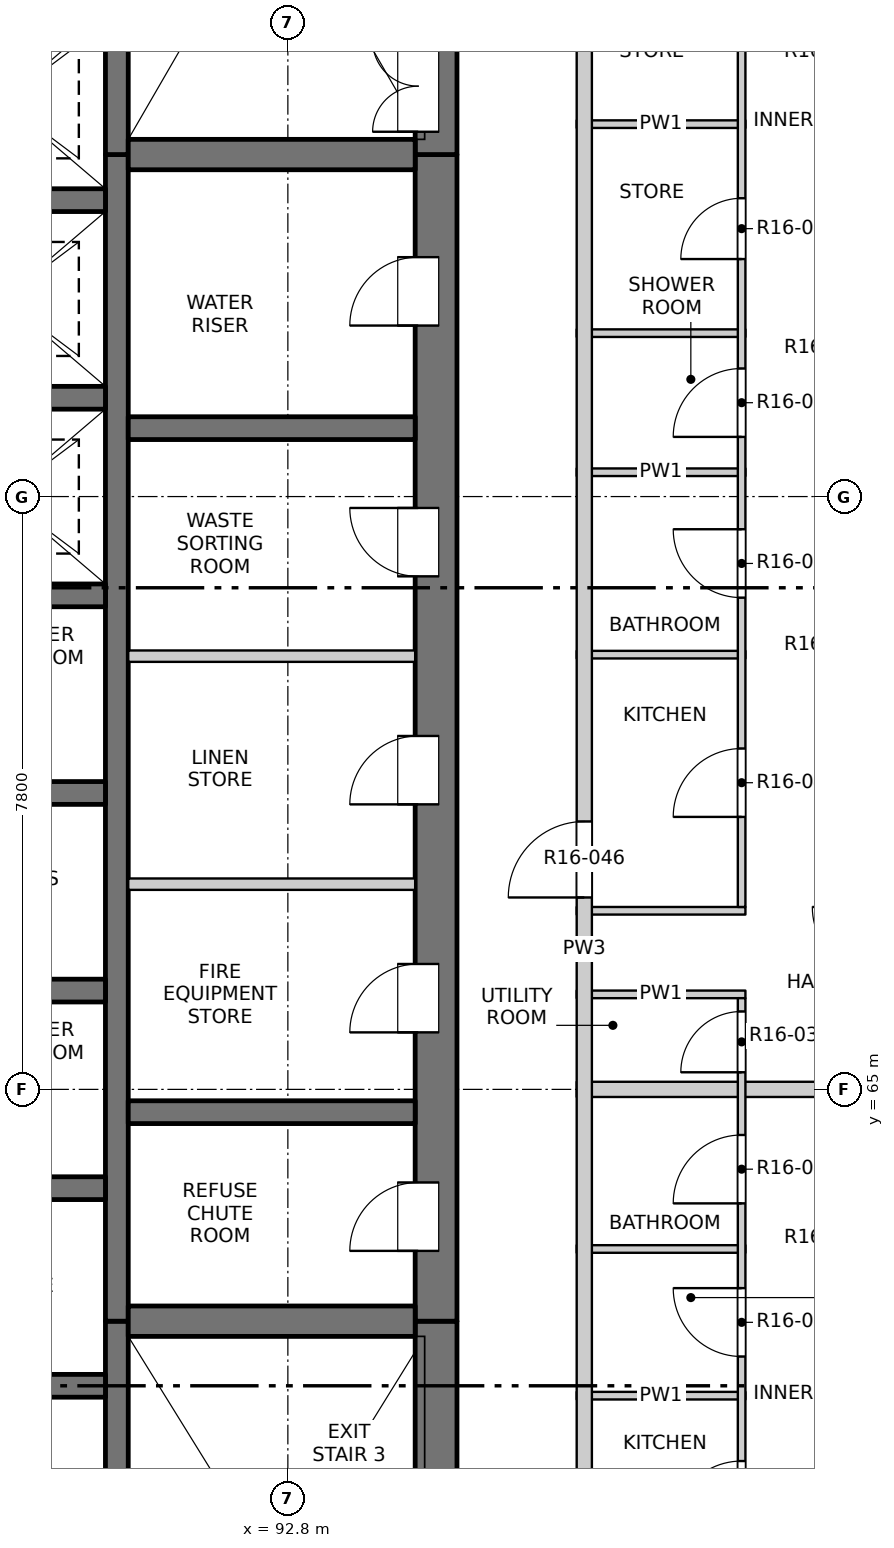
"""IFC4 building model, lengths in metres.
Left out: names, types, materials, properties, quantities, classifications, styles, units other than length and angle.
Written with IfcOpenShell. Run it as: python <this file> out.ifc"""

import sys

from ifc_helpers import new_model, si_unit, direction, frame, frame_2d, origin, place, context, subcontext, project, spatial, rectangle, extrude, element, fill, save


model = new_model("IFC4")
c1 = context("Model", 3, precision=1e-05, world=origin(), true_north=direction((0.0, 1.0)))
c2 = subcontext(c1, "Body", "Model", "MODEL_VIEW")
j1 = project(units=[si_unit("LENGTHUNIT", "METRE"), si_unit("PLANEANGLEUNIT", "RADIAN")], contexts=[c1])
p1 = place(None, origin())
s1 = spatial("IfcSite", under=j1, at=p1, CompositionType="ELEMENT")
p2 = place(p1, origin())
s2 = spatial("IfcBuilding", under=s1, at=p2, CompositionType="ELEMENT")
p3 = place(p2, frame((0.0, 0.0, 169.0)))
s3 = spatial("IfcBuildingStorey", under=s2, at=p3, CompositionType="ELEMENT", Elevation=169.0)
p4 = place(p3, frame((94.75, 54.975, -0.25), z_axis=(0.0, 0.0, 1.0), x_axis=(0.0, 1.0, 0.0)))
e1 = element("IfcWall", 1, at=p4, inside=s3, PredefinedType="SOLIDWALL", context=c2, shape_type="SweptSolid", body=[
    extrude(rectangle(XDim=6.975, YDim=0.55, at=frame_2d((3.487, 0.0))), origin(), (0.0, 0.0, 1.0), 3.35),
])
p5 = place(p4, frame((0.675, 0.0, 0.25)))
e2 = element("IfcOpeningElement", 2, at=p5, cuts=e1, PredefinedType="OPENING", context=c2, shape_type="SweptSolid", body=[
    extrude(rectangle(XDim=1.2, YDim=2.1, at=frame_2d((0.6, 1.05))), frame((0.0, 0.285, 0.0), z_axis=(0.0, -1.0, 0.0), x_axis=(1.0, 0.0, 0.0)), (0.0, 0.0, 1.0), 0.57),
])
p6 = place(p3, frame((94.75, 61.95, -0.25), z_axis=(0.0, 0.0, 1.0), x_axis=(0.0, 1.0, 0.0)))
e3 = element("IfcWall", 3, at=p6, inside=s3, PredefinedType="SOLIDWALL", context=c2, shape_type="SweptSolid", body=[
    extrude(rectangle(XDim=15.35, YDim=0.55, at=frame_2d((7.675, 0.0))), origin(), (0.0, 0.0, 1.0), 3.35),
])
p7 = place(p6, frame((0.925, 0.0, 0.25)))
e4 = element("IfcOpeningElement", 4, at=p7, cuts=e3, PredefinedType="OPENING", context=c2, shape_type="SweptSolid", body=[
    extrude(rectangle(XDim=0.9, YDim=2.1, at=frame_2d((0.45, 1.05))), frame((0.0, 0.285, 0.0), z_axis=(0.0, -1.0, 0.0), x_axis=(1.0, 0.0, 0.0)), (0.0, 0.0, 1.0), 0.57),
])
p8 = place(p6, frame((3.8, 0.0, 0.25)))
e5 = element("IfcOpeningElement", 5, at=p8, cuts=e3, PredefinedType="OPENING", context=c2, shape_type="SweptSolid", body=[
    extrude(rectangle(XDim=0.9, YDim=2.1, at=frame_2d((0.45, 1.05))), frame((0.0, 0.285, 0.0), z_axis=(0.0, -1.0, 0.0), x_axis=(1.0, 0.0, 0.0)), (0.0, 0.0, 1.0), 0.57),
])
p9 = place(p6, frame((6.8, 0.0, 0.25)))
e6 = element("IfcOpeningElement", 6, at=p9, cuts=e3, PredefinedType="OPENING", context=c2, shape_type="SweptSolid", body=[
    extrude(rectangle(XDim=0.9, YDim=2.1, at=frame_2d((0.45, 1.05))), frame((0.0, 0.285, 0.0), z_axis=(0.0, -1.0, 0.0), x_axis=(1.0, 0.0, 0.0)), (0.0, 0.0, 1.0), 0.57),
])
p10 = place(p6, frame((9.8, 0.0, 0.25)))
e7 = element("IfcOpeningElement", 7, at=p10, cuts=e3, PredefinedType="OPENING", context=c2, shape_type="SweptSolid", body=[
    extrude(rectangle(XDim=0.9, YDim=2.1, at=frame_2d((0.45, 1.05))), frame((0.0, 0.285, 0.0), z_axis=(0.0, -1.0, 0.0), x_axis=(1.0, 0.0, 0.0)), (0.0, 0.0, 1.0), 0.57),
])
p11 = place(p6, frame((13.1, 0.0, 0.25)))
e8 = element("IfcOpeningElement", 8, at=p11, cuts=e3, PredefinedType="OPENING", context=c2, shape_type="SweptSolid", body=[
    extrude(rectangle(XDim=0.9, YDim=2.1, at=frame_2d((0.45, 1.05))), frame((0.0, 0.285, 0.0), z_axis=(0.0, -1.0, 0.0), x_axis=(1.0, 0.0, 0.0)), (0.0, 0.0, 1.0), 0.57),
])
p12 = place(p3, frame((94.75, 77.3, -0.25), z_axis=(0.0, 0.0, 1.0), x_axis=(0.0, 1.0, 0.0)))
e9 = element("IfcWall", 9, at=p12, inside=s3, PredefinedType="SOLIDWALL", context=c2, shape_type="SweptSolid", body=[
    extrude(rectangle(XDim=7.475, YDim=0.55, at=frame_2d((3.737, 0.0))), origin(), (0.0, 0.0, 1.0), 3.35),
])
p13 = place(p12, frame((0.3, 0.0, 0.25)))
e10 = element("IfcOpeningElement", 10, at=p13, cuts=e9, PredefinedType="OPENING", context=c2, shape_type="SweptSolid", body=[
    extrude(rectangle(XDim=1.2, YDim=2.1, at=frame_2d((0.6, 1.05))), frame((0.0, 0.285, 0.0), z_axis=(0.0, -1.0, 0.0), x_axis=(1.0, 0.0, 0.0)), (0.0, 0.0, 1.0), 0.57),
])
p14 = place(p3, frame((90.55, 55.525, -0.25), z_axis=(0.0, 0.0, 1.0), x_axis=(0.0, 1.0, 0.0)))
e11 = element("IfcWall", 11, at=p14, inside=s3, PredefinedType="SOLIDWALL", context=c2, shape_type="SweptSolid", body=[
    extrude(rectangle(XDim=6.425, YDim=0.3, at=frame_2d((3.212, 0.0))), origin(), (0.0, 0.0, 1.0), 3.35),
])
p15 = place(p14, frame((0.125, 0.0, 0.25)))
e12 = element("IfcOpeningElement", 12, at=p15, cuts=e11, PredefinedType="OPENING", context=c2, shape_type="SweptSolid", body=[
    extrude(rectangle(XDim=1.2, YDim=2.1, at=frame_2d((0.6, 1.05))), frame((0.0, 0.16, 0.0), z_axis=(0.0, -1.0, 0.0), x_axis=(1.0, 0.0, 0.0)), (0.0, 0.0, 1.0), 0.32),
])
p16 = place(p3, frame((90.55, 61.95, -0.25), z_axis=(0.0, 0.0, 1.0), x_axis=(0.0, 1.0, 0.0)))
e13 = element("IfcWall", 13, at=p16, inside=s3, PredefinedType="SOLIDWALL", context=c2, shape_type="SweptSolid", body=[
    extrude(rectangle(XDim=15.35, YDim=0.3, at=frame_2d((7.675, 0.0))), origin(), (0.0, 0.0, 1.0), 3.35),
])
p17 = place(p3, frame((90.55, 77.3, -0.25), z_axis=(0.0, 0.0, 1.0), x_axis=(0.0, 1.0, 0.0)))
e14 = element("IfcWall", 14, at=p17, inside=s3, PredefinedType="SOLIDWALL", context=c2, shape_type="SweptSolid", body=[
    extrude(rectangle(XDim=6.925, YDim=0.3, at=frame_2d((3.462, 0.0))), origin(), (0.0, 0.0, 1.0), 3.35),
])
for number, where, z_axis, x_axis in (
    (15, (87.4, 61.1, -0.25), (0.0, 0.0, 1.0), (1.0, 0.0, 0.0)),
    (16, (87.4, 63.7, -0.25), (0.0, 0.0, 1.0), (1.0, 0.0, 0.0)),
    (17, (87.4, 66.3, -0.25), (0.0, 0.0, 1.0), (1.0, 0.0, 0.0)),
    (18, (87.4, 68.9, -0.25), (0.0, 0.0, 1.0), (1.0, 0.0, 0.0)),
    (19, (87.4, 71.5, -0.25), (0.0, 0.0, 1.0), (1.0, 0.0, 0.0)),
    (20, (87.4, 74.1, -0.25), (0.0, 0.0, 1.0), (1.0, 0.0, 0.0)),
    (21, (87.4, 76.7, -0.25), (0.0, 0.0, 1.0), (1.0, 0.0, 0.0)),
):
    element("IfcWall", number, at=place(p3, frame(where, z_axis=z_axis, x_axis=x_axis)), inside=s3, PredefinedType="SOLIDWALL", context=c2, shape_type="SweptSolid", body=[
        extrude(rectangle(XDim=3.0, YDim=0.3, at=frame_2d((1.5, 0.0))), origin(), (0.0, 0.0, 1.0), 3.35),
    ])
p18 = place(p3, frame((90.7, 61.95, -0.25), z_axis=(0.0, 0.0, 1.0), x_axis=(1.0, 0.0, 0.0)))
e22 = element("IfcWall", 22, at=p18, inside=s3, PredefinedType="SOLIDWALL", context=c2, shape_type="SweptSolid", body=[
    extrude(rectangle(XDim=3.775, YDim=0.4, at=frame_2d((1.888, 0.0))), origin(), (0.0, 0.0, 1.0), 3.35),
])
for number, where, z_axis, x_axis in (
    (23, (90.7, 64.7, -0.25), (0.0, 0.0, 1.0), (1.0, 0.0, 0.0)),
    (24, (90.7, 73.7, -0.25), (0.0, 0.0, 1.0), (1.0, 0.0, 0.0)),
):
    element("IfcWall", number, at=place(p3, frame(where, z_axis=z_axis, x_axis=x_axis)), inside=s3, PredefinedType="SOLIDWALL", context=c2, shape_type="SweptSolid", body=[
        extrude(rectangle(XDim=3.775, YDim=0.3, at=frame_2d((1.888, 0.0))), origin(), (0.0, 0.0, 1.0), 3.35),
    ])
p19 = place(p3, frame((90.7, 77.3, -0.25), z_axis=(0.0, 0.0, 1.0), x_axis=(1.0, 0.0, 0.0)))
e25 = element("IfcWall", 25, at=p19, inside=s3, PredefinedType="SOLIDWALL", context=c2, shape_type="SweptSolid", body=[
    extrude(rectangle(XDim=3.775, YDim=0.4, at=frame_2d((1.888, 0.0))), origin(), (0.0, 0.0, 1.0), 3.35),
])
for number, where, z_axis, x_axis in (
    (26, (96.6, 60.97, 0.0), (0.0, 0.0, 1.0), (1.0, 0.0, 0.0)),
    (27, (96.6, 62.9, 0.0), (0.0, 0.0, 1.0), (1.0, 0.0, 0.0)),
):
    element("IfcWall", number, at=place(p3, frame(where, z_axis=z_axis, x_axis=x_axis)), inside=s3, PredefinedType="PARTITIONING", context=c2, shape_type="SweptSolid", body=[
        extrude(rectangle(XDim=2.22, YDim=0.1, at=frame_2d((1.11, 0.0))), origin(), (0.0, 0.0, 1.0), 3.1),
    ])
p20 = place(p3, frame((96.6, 65.0, 0.0), z_axis=(0.0, 0.0, 1.0), x_axis=(1.0, 0.0, 0.0)))
e28 = element("IfcWall", 28, at=p20, inside=s3, PredefinedType="PARTITIONING", context=c2, shape_type="SweptSolid", body=[
    extrude(rectangle(XDim=7.6, YDim=0.2, at=frame_2d((3.8, 0.0))), origin(), (0.0, 0.0, 1.0), 3.1),
])
for number, where, z_axis, x_axis in (
    (29, (96.6, 66.25, 0.0), (0.0, 0.0, 1.0), (1.0, 0.0, 0.0)),
    (30, (96.6, 67.35, 0.0), (0.0, 0.0, 1.0), (1.0, 0.0, 0.0)),
):
    element("IfcWall", number, at=place(p3, frame(where, z_axis=z_axis, x_axis=x_axis)), inside=s3, PredefinedType="PARTITIONING", context=c2, shape_type="SweptSolid", body=[
        extrude(rectangle(XDim=2.22, YDim=0.1, at=frame_2d((1.11, 0.0))), origin(), (0.0, 0.0, 1.0), 3.1),
    ])
for number, where, z_axis, x_axis in (
    (31, (90.7, 67.7, 0.0), (0.0, 0.0, 1.0), (1.0, 0.0, 0.0)),
    (32, (90.7, 70.7, 0.0), (0.0, 0.0, 1.0), (1.0, 0.0, 0.0)),
):
    element("IfcWall", number, at=place(p3, frame(where, z_axis=z_axis, x_axis=x_axis)), inside=s3, PredefinedType="PARTITIONING", context=c2, shape_type="SweptSolid", body=[
        extrude(rectangle(XDim=3.775, YDim=0.15, at=frame_2d((1.887, 0.0))), origin(), (0.0, 0.0, 1.0), 3.1),
    ])
for number, where, z_axis, x_axis in (
    (33, (96.6, 70.72, 0.0), (0.0, 0.0, 1.0), (1.0, 0.0, 0.0)),
    (34, (96.6, 73.12, 0.0), (0.0, 0.0, 1.0), (1.0, 0.0, 0.0)),
    (35, (96.6, 74.95, 0.0), (0.0, 0.0, 1.0), (1.0, 0.0, 0.0)),
    (36, (96.6, 77.7, 0.0), (0.0, 0.0, 1.0), (1.0, 0.0, 0.0)),
):
    element("IfcWall", number, at=place(p3, frame(where, z_axis=z_axis, x_axis=x_axis)), inside=s3, PredefinedType="PARTITIONING", context=c2, shape_type="SweptSolid", body=[
        extrude(rectangle(XDim=2.22, YDim=0.1, at=frame_2d((1.11, 0.0))), origin(), (0.0, 0.0, 1.0), 3.1),
    ])
p21 = place(p3, frame((96.7, 49.5, 0.0), z_axis=(0.0, 0.0, 1.0), x_axis=(0.0, 1.0, 0.0)))
e37 = element("IfcWall", 37, at=p21, inside=s3, PredefinedType="PARTITIONING", context=c2, shape_type="SweptSolid", body=[
    extrude(rectangle(XDim=34.7, YDim=0.2, at=frame_2d((17.35, 0.0))), origin(), (0.0, 0.0, 1.0), 3.1),
])
p22 = place(p21, frame((6.875, 0.0, 0.0)))
e38 = element("IfcOpeningElement", 38, at=p22, cuts=e37, PredefinedType="OPENING", context=c2, shape_type="SweptSolid", body=[
    extrude(rectangle(XDim=1.0, YDim=2.1, at=frame_2d((0.5, 1.05))), frame((0.0, 0.11, 0.0), z_axis=(0.0, -1.0, 0.0), x_axis=(1.0, 0.0, 0.0)), (0.0, 0.0, 1.0), 0.22),
])
p23 = place(p21, frame((18.025, 0.0, 0.0)))
e39 = element("IfcOpeningElement", 39, at=p23, cuts=e37, PredefinedType="OPENING", context=c2, shape_type="SweptSolid", body=[
    extrude(rectangle(XDim=1.0, YDim=2.1, at=frame_2d((0.5, 1.05))), frame((0.0, 0.11, 0.0), z_axis=(0.0, -1.0, 0.0), x_axis=(1.0, 0.0, 0.0)), (0.0, 0.0, 1.0), 0.22),
])
p24 = place(p3, frame((98.77, 56.25, 0.0), z_axis=(0.0, 0.0, 1.0), x_axis=(0.0, 1.0, 0.0)))
e40 = element("IfcWall", 40, at=p24, inside=s3, PredefinedType="PARTITIONING", context=c2, shape_type="SweptSolid", body=[
    extrude(rectangle(XDim=9.95, YDim=0.1, at=frame_2d((4.975, 0.0))), origin(), (0.0, 0.0, 1.0), 3.1),
])
p25 = place(p24, frame((0.625, 0.0, 0.0)))
e41 = element("IfcOpeningElement", 41, at=p25, cuts=e40, PredefinedType="OPENING", context=c2, shape_type="SweptSolid", body=[
    extrude(rectangle(XDim=0.8, YDim=2.1, at=frame_2d((0.4, 1.05))), frame((0.0, 0.06, 0.0), z_axis=(0.0, -1.0, 0.0), x_axis=(1.0, 0.0, 0.0)), (0.0, 0.0, 1.0), 0.12),
])
p26 = place(p24, frame((2.96, 0.0, 0.0)))
e42 = element("IfcOpeningElement", 42, at=p26, cuts=e40, PredefinedType="OPENING", context=c2, shape_type="SweptSolid", body=[
    extrude(rectangle(XDim=0.9, YDim=2.1, at=frame_2d((0.45, 1.05))), frame((0.0, 0.06, 0.0), z_axis=(0.0, -1.0, 0.0), x_axis=(1.0, 0.0, 0.0)), (0.0, 0.0, 1.0), 0.12),
])
p27 = place(p24, frame((5.235, 0.0, 0.0)))
e43 = element("IfcOpeningElement", 43, at=p27, cuts=e40, PredefinedType="OPENING", context=c2, shape_type="SweptSolid", body=[
    extrude(rectangle(XDim=0.9, YDim=2.1, at=frame_2d((0.45, 1.05))), frame((0.0, 0.06, 0.0), z_axis=(0.0, -1.0, 0.0), x_axis=(1.0, 0.0, 0.0)), (0.0, 0.0, 1.0), 0.12),
])
p28 = place(p24, frame((7.25, 0.0, 0.0)))
e44 = element("IfcOpeningElement", 44, at=p28, cuts=e40, PredefinedType="OPENING", context=c2, shape_type="SweptSolid", body=[
    extrude(rectangle(XDim=0.9, YDim=2.1, at=frame_2d((0.45, 1.05))), frame((0.0, 0.06, 0.0), z_axis=(0.0, -1.0, 0.0), x_axis=(1.0, 0.0, 0.0)), (0.0, 0.0, 1.0), 0.12),
])
p29 = place(p24, frame((8.975, 0.0, 0.0)))
e45 = element("IfcOpeningElement", 45, at=p29, cuts=e40, PredefinedType="OPENING", context=c2, shape_type="SweptSolid", body=[
    extrude(rectangle(XDim=0.8, YDim=2.1, at=frame_2d((0.4, 1.05))), frame((0.0, 0.06, 0.0), z_axis=(0.0, -1.0, 0.0), x_axis=(1.0, 0.0, 0.0)), (0.0, 0.0, 1.0), 0.12),
])
p30 = place(p3, frame((98.77, 67.4, 0.0), z_axis=(0.0, 0.0, 1.0), x_axis=(0.0, 1.0, 0.0)))
e46 = element("IfcWall", 46, at=p30, inside=s3, PredefinedType="PARTITIONING", context=c2, shape_type="SweptSolid", body=[
    extrude(rectangle(XDim=13.15, YDim=0.1, at=frame_2d((6.575, 0.0))), origin(), (0.0, 0.0, 1.0), 3.1),
])
p31 = place(p30, frame((1.185, 0.0, 0.0)))
e47 = element("IfcOpeningElement", 47, at=p31, cuts=e46, PredefinedType="OPENING", context=c2, shape_type="SweptSolid", body=[
    extrude(rectangle(XDim=0.9, YDim=2.1, at=frame_2d((0.45, 1.05))), frame((0.0, 0.06, 0.0), z_axis=(0.0, -1.0, 0.0), x_axis=(1.0, 0.0, 0.0)), (0.0, 0.0, 1.0), 0.12),
])
p32 = place(p30, frame((4.07, 0.0, 0.0)))
e48 = element("IfcOpeningElement", 48, at=p32, cuts=e46, PredefinedType="OPENING", context=c2, shape_type="SweptSolid", body=[
    extrude(rectangle(XDim=0.9, YDim=2.1, at=frame_2d((0.45, 1.05))), frame((0.0, 0.06, 0.0), z_axis=(0.0, -1.0, 0.0), x_axis=(1.0, 0.0, 0.0)), (0.0, 0.0, 1.0), 0.12),
])
p33 = place(p30, frame((6.185, 0.0, 0.0)))
e49 = element("IfcOpeningElement", 49, at=p33, cuts=e46, PredefinedType="OPENING", context=c2, shape_type="SweptSolid", body=[
    extrude(rectangle(XDim=0.9, YDim=2.1, at=frame_2d((0.45, 1.05))), frame((0.0, 0.06, 0.0), z_axis=(0.0, -1.0, 0.0), x_axis=(1.0, 0.0, 0.0)), (0.0, 0.0, 1.0), 0.12),
])
p34 = place(p30, frame((8.525, 0.0, 0.0)))
e50 = element("IfcOpeningElement", 50, at=p34, cuts=e46, PredefinedType="OPENING", context=c2, shape_type="SweptSolid", body=[
    extrude(rectangle(XDim=0.8, YDim=2.1, at=frame_2d((0.4, 1.05))), frame((0.0, 0.06, 0.0), z_axis=(0.0, -1.0, 0.0), x_axis=(1.0, 0.0, 0.0)), (0.0, 0.0, 1.0), 0.12),
])
p35 = place(p30, frame((11.35, 0.0, 0.0)))
e51 = element("IfcOpeningElement", 51, at=p35, cuts=e46, PredefinedType="OPENING", context=c2, shape_type="SweptSolid", body=[
    extrude(rectangle(XDim=0.8, YDim=2.1, at=frame_2d((0.4, 1.05))), frame((0.0, 0.06, 0.0), z_axis=(0.0, -1.0, 0.0), x_axis=(1.0, 0.0, 0.0)), (0.0, 0.0, 1.0), 0.12),
])
p36 = place(p26, origin())
e52 = element("IfcDoor", 52, at=p36, inside=s3, OperationType="SINGLE_SWING_LEFT", PredefinedType="DOOR", context=c2, shape_type="SweptSolid", body=[
    extrude(rectangle(XDim=0.9, YDim=2.1, at=frame_2d((0.45, 1.05))), frame((0.0, 0.025, 0.0), z_axis=(0.0, -1.0, 0.0), x_axis=(1.0, 0.0, 0.0)), (0.0, 0.0, 1.0), 0.05),
])
fill(e42, e52)
p37 = place(p27, origin())
e53 = element("IfcDoor", 53, at=p37, inside=s3, OperationType="SINGLE_SWING_RIGHT", PredefinedType="DOOR", context=c2, shape_type="SweptSolid", body=[
    extrude(rectangle(XDim=0.9, YDim=2.1, at=frame_2d((0.45, 1.05))), frame((0.0, 0.025, 0.0), z_axis=(0.0, -1.0, 0.0), x_axis=(1.0, 0.0, 0.0)), (0.0, 0.0, 1.0), 0.05),
])
fill(e43, e53)
p38 = place(p7, origin())
e54 = element("IfcDoor", 54, at=p38, inside=s3, OperationType="SINGLE_SWING_LEFT", PredefinedType="DOOR", context=c2, shape_type="SweptSolid", body=[
    extrude(rectangle(XDim=0.9, YDim=2.1, at=frame_2d((0.45, 1.05))), frame((0.0, 0.26, 0.0), z_axis=(0.0, -1.0, 0.0), x_axis=(1.0, 0.0, 0.0)), (0.0, 0.0, 1.0), 0.05),
])
fill(e4, e54)
p39 = place(p28, origin())
e55 = element("IfcDoor", 55, at=p39, inside=s3, OperationType="SINGLE_SWING_LEFT", PredefinedType="DOOR", context=c2, shape_type="SweptSolid", body=[
    extrude(rectangle(XDim=0.9, YDim=2.1, at=frame_2d((0.45, 1.05))), frame((0.0, 0.025, 0.0), z_axis=(0.0, -1.0, 0.0), x_axis=(1.0, 0.0, 0.0)), (0.0, 0.0, 1.0), 0.05),
])
fill(e44, e55)
p40 = place(p29, origin())
e56 = element("IfcDoor", 56, at=p40, inside=s3, OperationType="SINGLE_SWING_LEFT", PredefinedType="DOOR", context=c2, shape_type="SweptSolid", body=[
    extrude(rectangle(XDim=0.8, YDim=2.1, at=frame_2d((0.4, 1.05))), frame((0.0, 0.025, 0.0), z_axis=(0.0, -1.0, 0.0), x_axis=(1.0, 0.0, 0.0)), (0.0, 0.0, 1.0), 0.05),
])
fill(e45, e56)
p41 = place(p8, origin())
e57 = element("IfcDoor", 57, at=p41, inside=s3, OperationType="SINGLE_SWING_LEFT", PredefinedType="DOOR", context=c2, shape_type="SweptSolid", body=[
    extrude(rectangle(XDim=0.9, YDim=2.1, at=frame_2d((0.45, 1.05))), frame((0.0, 0.26, 0.0), z_axis=(0.0, -1.0, 0.0), x_axis=(1.0, 0.0, 0.0)), (0.0, 0.0, 1.0), 0.05),
])
fill(e5, e57)
p42 = place(p23, origin())
e58 = element("IfcDoor", 58, at=p42, inside=s3, OperationType="SINGLE_SWING_LEFT", PredefinedType="DOOR", context=c2, shape_type="SweptSolid", body=[
    extrude(rectangle(XDim=1.0, YDim=2.1, at=frame_2d((0.5, 1.05))), frame((0.0, 0.025, 0.0), z_axis=(0.0, -1.0, 0.0), x_axis=(1.0, 0.0, 0.0)), (0.0, 0.0, 1.0), 0.05),
])
fill(e39, e58)
p43 = place(p31, origin())
e59 = element("IfcDoor", 59, at=p43, inside=s3, OperationType="SINGLE_SWING_LEFT", PredefinedType="DOOR", context=c2, shape_type="SweptSolid", body=[
    extrude(rectangle(XDim=0.9, YDim=2.1, at=frame_2d((0.45, 1.05))), frame((0.0, 0.025, 0.0), z_axis=(0.0, -1.0, 0.0), x_axis=(1.0, 0.0, 0.0)), (0.0, 0.0, 1.0), 0.05),
])
fill(e47, e59)
p44 = place(p9, origin())
e60 = element("IfcDoor", 60, at=p44, inside=s3, OperationType="SINGLE_SWING_LEFT", PredefinedType="DOOR", context=c2, shape_type="SweptSolid", body=[
    extrude(rectangle(XDim=0.9, YDim=2.1, at=frame_2d((0.45, 1.05))), frame((0.0, 0.26, 0.0), z_axis=(0.0, -1.0, 0.0), x_axis=(1.0, 0.0, 0.0)), (0.0, 0.0, 1.0), 0.05),
])
fill(e6, e60)
p45 = place(p32, origin())
e61 = element("IfcDoor", 61, at=p45, inside=s3, OperationType="SINGLE_SWING_RIGHT", PredefinedType="DOOR", context=c2, shape_type="SweptSolid", body=[
    extrude(rectangle(XDim=0.9, YDim=2.1, at=frame_2d((0.45, 1.05))), frame((0.0, 0.025, 0.0), z_axis=(0.0, -1.0, 0.0), x_axis=(1.0, 0.0, 0.0)), (0.0, 0.0, 1.0), 0.05),
])
fill(e48, e61)
p46 = place(p10, origin())
e62 = element("IfcDoor", 62, at=p46, inside=s3, OperationType="SINGLE_SWING_RIGHT", PredefinedType="DOOR", context=c2, shape_type="SweptSolid", body=[
    extrude(rectangle(XDim=0.9, YDim=2.1, at=frame_2d((0.45, 1.05))), frame((0.0, 0.26, 0.0), z_axis=(0.0, -1.0, 0.0), x_axis=(1.0, 0.0, 0.0)), (0.0, 0.0, 1.0), 0.05),
])
fill(e7, e62)
p47 = place(p33, origin())
e63 = element("IfcDoor", 63, at=p47, inside=s3, OperationType="SINGLE_SWING_LEFT", PredefinedType="DOOR", context=c2, shape_type="SweptSolid", body=[
    extrude(rectangle(XDim=0.9, YDim=2.1, at=frame_2d((0.45, 1.05))), frame((0.0, 0.025, 0.0), z_axis=(0.0, -1.0, 0.0), x_axis=(1.0, 0.0, 0.0)), (0.0, 0.0, 1.0), 0.05),
])
fill(e49, e63)
p48 = place(p11, origin())
e64 = element("IfcDoor", 64, at=p48, inside=s3, OperationType="SINGLE_SWING_LEFT", PredefinedType="DOOR", context=c2, shape_type="SweptSolid", body=[
    extrude(rectangle(XDim=0.9, YDim=2.1, at=frame_2d((0.45, 1.05))), frame((0.0, 0.26, 0.0), z_axis=(0.0, -1.0, 0.0), x_axis=(1.0, 0.0, 0.0)), (0.0, 0.0, 1.0), 0.05),
])
fill(e8, e64)
p49 = place(p34, origin())
e65 = element("IfcDoor", 65, at=p49, inside=s3, OperationType="SINGLE_SWING_LEFT", PredefinedType="DOOR", context=c2, shape_type="SweptSolid", body=[
    extrude(rectangle(XDim=0.8, YDim=2.1, at=frame_2d((0.4, 1.05))), frame((0.0, 0.025, 0.0), z_axis=(0.0, -1.0, 0.0), x_axis=(1.0, 0.0, 0.0)), (0.0, 0.0, 1.0), 0.05),
])
fill(e50, e65)
p50 = place(p13, origin())
e66 = element("IfcDoor", 66, at=p50, inside=s3, OperationType="DOUBLE_DOOR_SINGLE_SWING", PredefinedType="DOOR", context=c2, shape_type="SweptSolid", body=[
    extrude(rectangle(XDim=1.2, YDim=2.1, at=frame_2d((0.6, 1.05))), frame((0.0, 0.26, 0.0), z_axis=(0.0, -1.0, 0.0), x_axis=(1.0, 0.0, 0.0)), (0.0, 0.0, 1.0), 0.05),
])
fill(e10, e66)
save(model, sys.argv[1])
